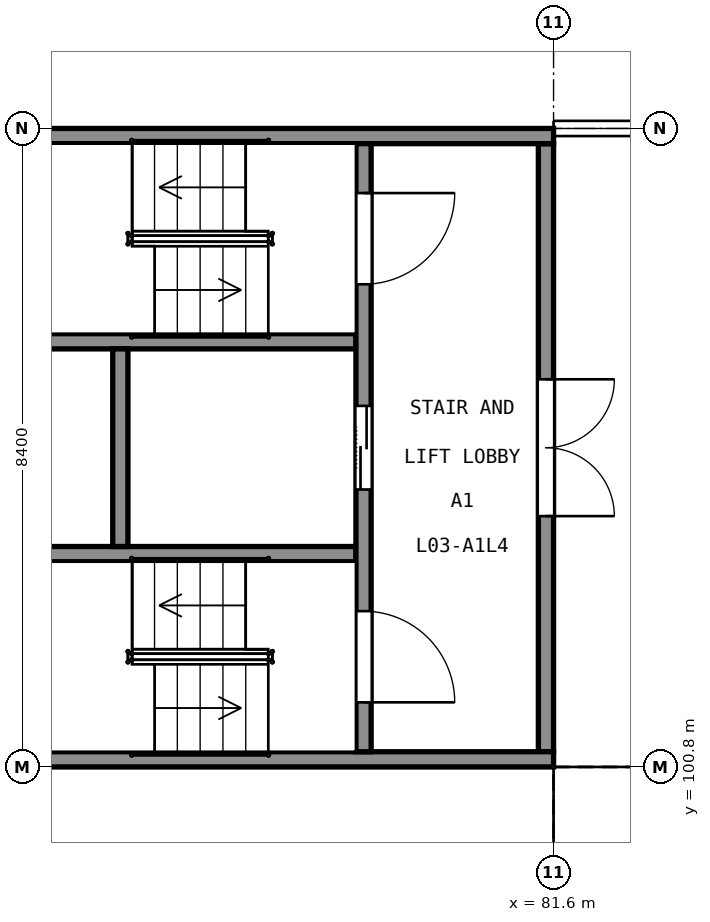
"""IFC4 building model, lengths in metres.
Left out: names, types, materials, properties, quantities, classifications, styles, units other than length and angle.
Written with IfcOpenShell. Run it as: python <this file> out.ifc"""

import sys

from ifc_helpers import new_model, si_unit, direction, frame, frame_2d, origin, place, context, subcontext, project, spatial, rectangle, extrude, element, fill, save


model = new_model("IFC4")
c1 = context("Model", 3, precision=1e-05, world=origin(), true_north=direction((0.0, 1.0)))
c2 = subcontext(c1, "Body", "Model", "MODEL_VIEW")
j1 = project(units=[si_unit("LENGTHUNIT", "METRE"), si_unit("PLANEANGLEUNIT", "RADIAN")], contexts=[c1])
p1 = place(None, origin())
s1 = spatial("IfcSite", under=j1, at=p1, CompositionType="ELEMENT")
p2 = place(p1, origin())
s2 = spatial("IfcBuilding", under=s1, at=p2, CompositionType="ELEMENT")
p3 = place(p2, frame((0.0, 0.0, 20.0)))
s3 = spatial("IfcBuildingStorey", under=s2, at=p3, CompositionType="ELEMENT", Elevation=20.0)
for number, where, z_axis, x_axis in (
    (1, (73.2, 100.9, 0.0), (0.0, 0.0, 1.0), (1.0, 0.0, 0.0)),
    (2, (73.2, 109.1, 0.0), (0.0, 0.0, 1.0), (1.0, 0.0, 0.0)),
):
    element("IfcWall", number, at=place(p3, frame(where, z_axis=z_axis, x_axis=x_axis)), inside=s3, PredefinedType="SHEAR", context=c2, shape_type="SweptSolid", body=[
        extrude(rectangle(XDim=8.4, YDim=0.2, at=frame_2d((4.2, 0.0))), origin(), (0.0, 0.0, 1.0), 5.0),
    ])
p4 = place(p3, frame((81.5, 101.0, 0.0), z_axis=(0.0, 0.0, 1.0), x_axis=(0.0, 1.0, 0.0)))
e3 = element("IfcWall", 3, at=p4, inside=s3, PredefinedType="SHEAR", context=c2, shape_type="SweptSolid", body=[
    extrude(rectangle(XDim=8.0, YDim=0.2, at=frame_2d((4.0, 0.0))), origin(), (0.0, 0.0, 1.0), 5.0),
])
p5 = place(p4, frame((3.1, 0.0, 0.0)))
e4 = element("IfcOpeningElement", 4, at=p5, cuts=e3, PredefinedType="OPENING", context=c2, shape_type="SweptSolid", body=[
    extrude(rectangle(XDim=1.8, YDim=2.1, at=frame_2d((0.9, 1.05))), frame((0.0, 0.11, 0.0), z_axis=(0.0, -1.0, 0.0), x_axis=(1.0, 0.0, 0.0)), (0.0, 0.0, 1.0), 0.22),
])
p6 = place(p3, frame((79.1, 101.0, 0.0), z_axis=(0.0, 0.0, 1.0), x_axis=(0.0, 1.0, 0.0)))
e5 = element("IfcWall", 5, at=p6, inside=s3, PredefinedType="SHEAR", context=c2, shape_type="SweptSolid", body=[
    extrude(rectangle(XDim=8.0, YDim=0.2, at=frame_2d((4.0, 0.0))), origin(), (0.0, 0.0, 1.0), 5.0),
])
p7 = place(p6, frame((0.65, 0.0, 0.0)))
e6 = element("IfcOpeningElement", 6, at=p7, cuts=e5, PredefinedType="OPENING", context=c2, shape_type="SweptSolid", body=[
    extrude(rectangle(XDim=1.2, YDim=2.1, at=frame_2d((0.6, 1.05))), frame((0.0, 0.11, 0.0), z_axis=(0.0, -1.0, 0.0), x_axis=(1.0, 0.0, 0.0)), (0.0, 0.0, 1.0), 0.22),
])
p8 = place(p6, frame((6.15, 0.0, 0.0)))
e7 = element("IfcOpeningElement", 7, at=p8, cuts=e5, PredefinedType="OPENING", context=c2, shape_type="SweptSolid", body=[
    extrude(rectangle(XDim=1.2, YDim=2.1, at=frame_2d((0.6, 1.05))), frame((0.0, 0.11, 0.0), z_axis=(0.0, -1.0, 0.0), x_axis=(1.0, 0.0, 0.0)), (0.0, 0.0, 1.0), 0.22),
])
p9 = place(p6, frame((3.45, 0.0, 0.0)))
e8 = element("IfcOpeningElement", 8, at=p9, cuts=e5, PredefinedType="OPENING", context=c2, shape_type="SweptSolid", body=[
    extrude(rectangle(XDim=1.1, YDim=2.1, at=frame_2d((0.55, 1.05))), frame((0.0, 0.11, 0.0), z_axis=(0.0, -1.0, 0.0), x_axis=(1.0, 0.0, 0.0)), (0.0, 0.0, 1.0), 0.22),
])
for number, where, z_axis, x_axis in (
    (9, (73.4, 103.6, 0.0), (0.0, 0.0, 1.0), (1.0, 0.0, 0.0)),
    (10, (73.4, 106.4, 0.0), (0.0, 0.0, 1.0), (1.0, 0.0, 0.0)),
):
    element("IfcWall", number, at=place(p3, frame(where, z_axis=z_axis, x_axis=x_axis)), inside=s3, PredefinedType="SHEAR", context=c2, shape_type="SweptSolid", body=[
        extrude(rectangle(XDim=5.6, YDim=0.2, at=frame_2d((2.8, 0.0))), origin(), (0.0, 0.0, 1.0), 5.0),
    ])
p10 = place(p3, frame((75.9, 103.7, 0.0), z_axis=(0.0, 0.0, 1.0), x_axis=(0.0, 1.0, 0.0)))
e11 = element("IfcWall", 11, at=p10, inside=s3, PredefinedType="SHEAR", context=c2, shape_type="SweptSolid", body=[
    extrude(rectangle(XDim=2.6, YDim=0.2, at=frame_2d((1.3, 0.0))), origin(), (0.0, 0.0, 1.0), 5.0),
])
p11 = place(p5, origin())
e12 = element("IfcDoor", 12, at=p11, inside=s3, OperationType="DOUBLE_DOOR_SINGLE_SWING", PredefinedType="DOOR", context=c2, shape_type="SweptSolid", body=[
    extrude(rectangle(XDim=1.8, YDim=2.1, at=frame_2d((0.9, 1.05))), frame((0.0, 0.025, 0.0), z_axis=(0.0, -1.0, 0.0), x_axis=(1.0, 0.0, 0.0)), (0.0, 0.0, 1.0), 0.05),
])
fill(e4, e12)
p12 = place(p7, origin())
e13 = element("IfcDoor", 13, at=p12, inside=s3, OperationType="SINGLE_SWING_LEFT", PredefinedType="DOOR", context=c2, shape_type="SweptSolid", body=[
    extrude(rectangle(XDim=1.2, YDim=2.1, at=frame_2d((0.6, 1.05))), frame((0.0, 0.025, 0.0), z_axis=(0.0, -1.0, 0.0), x_axis=(1.0, 0.0, 0.0)), (0.0, 0.0, 1.0), 0.05),
])
fill(e6, e13)
p13 = place(p8, origin())
e14 = element("IfcDoor", 14, at=p13, inside=s3, OperationType="SINGLE_SWING_RIGHT", PredefinedType="DOOR", context=c2, shape_type="SweptSolid", body=[
    extrude(rectangle(XDim=1.2, YDim=2.1, at=frame_2d((0.6, 1.05))), frame((0.0, 0.025, 0.0), z_axis=(0.0, -1.0, 0.0), x_axis=(1.0, 0.0, 0.0)), (0.0, 0.0, 1.0), 0.05),
])
fill(e7, e14)
p14 = place(p9, origin())
e15 = element("IfcDoor", 15, at=p14, inside=s3, OperationType="DOUBLE_DOOR_SLIDING", PredefinedType="DOOR", context=c2, shape_type="SweptSolid", body=[
    extrude(rectangle(XDim=1.1, YDim=2.1, at=frame_2d((0.55, 1.05))), frame((0.0, 0.025, 0.0), z_axis=(0.0, -1.0, 0.0), x_axis=(1.0, 0.0, 0.0)), (0.0, 0.0, 1.0), 0.05),
])
fill(e8, e15)
save(model, sys.argv[1])
